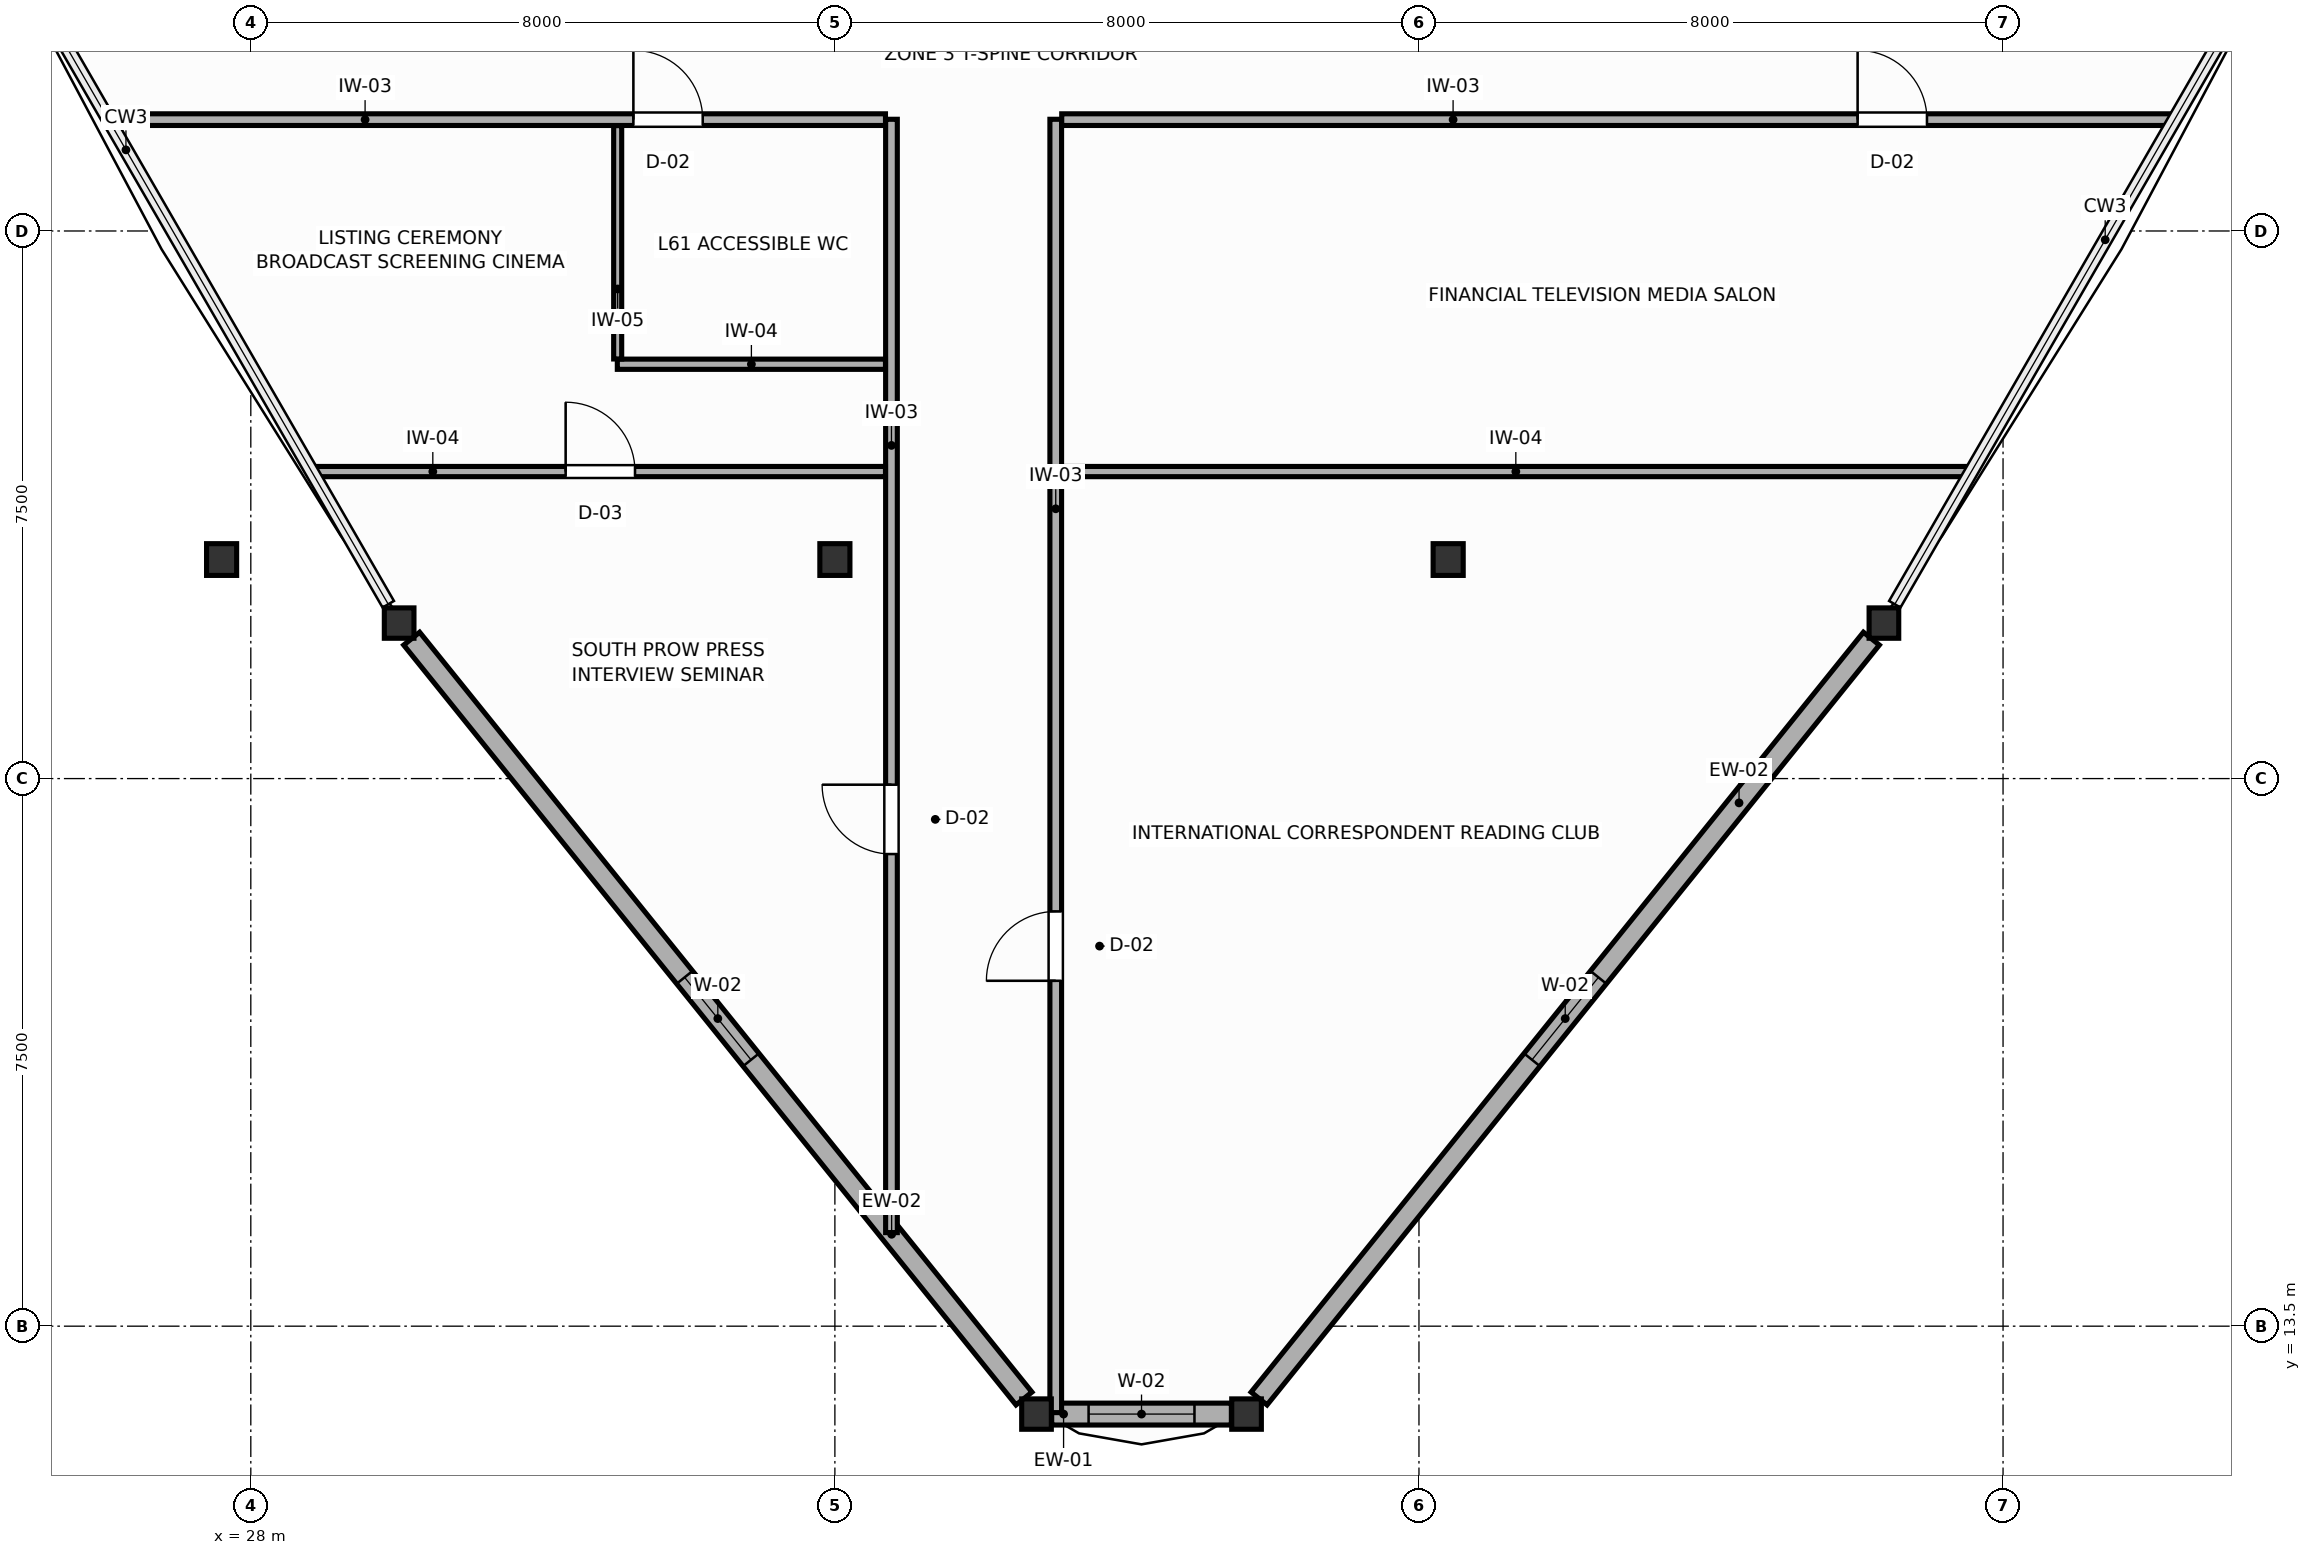
"""IFC4 building model, lengths in metres.
Left out: names, types, materials, properties, quantities, classifications, styles, units other than length and angle.
Written with IfcOpenShell. Run it as: python <this file> out.ifc"""

import sys

from ifc_helpers import new_model, si_unit, direction, frame, frame_2d, origin, origin_2d, place, context, subcontext, project, spatial, rectangle, i_section, extrude, source, transform, mapped, element, fill, save


model = new_model("IFC4")
c1 = context("Model", 3, precision=1e-05, world=origin(), true_north=direction((0.0, 1.0)))
c2 = subcontext(c1, "Body", "Model", "MODEL_VIEW")
j1 = project(units=[si_unit("LENGTHUNIT", "METRE"), si_unit("PLANEANGLEUNIT", "RADIAN")], contexts=[c1])
p1 = place(None, origin())
s1 = spatial("IfcSite", under=j1, at=p1, CompositionType="ELEMENT")
p2 = place(p1, origin())
s2 = spatial("IfcBuilding", under=s1, at=p2, CompositionType="ELEMENT")
p3 = place(p2, frame((0.0, 0.0, 234.6)))
s3 = spatial("IfcBuildingStorey", under=s2, at=p3, CompositionType="ELEMENT", Elevation=234.6)
m1 = source(origin(), c2, "Body", "SweptSolid", [
    extrude(i_section(OverallWidth=0.412, OverallDepth=0.435, WebThickness=0.033, FlangeThickness=0.053, FilletRadius=0.015, at=origin_2d()), origin(), (0.0, 0.0, 1.0), 3.6),
])
for number, where, z_axis, x_axis in (
    (1, (27.6, 24.0, 0.0), (0.0, 0.0, 1.0), (1.0, 0.0, 0.0)),
    (2, (44.4, 24.0, 0.0), (0.0, 0.0, 1.0), (1.0, 0.0, 0.0)),
    (3, (36.0, 24.0, 0.0), (0.0, 0.0, 1.0), (1.0, 0.0, 0.0)),
):
    element("IfcColumn", number, at=place(p3, frame(where, z_axis=z_axis, x_axis=x_axis)), inside=s3, PredefinedType="COLUMN", context=c2, shape_type="MappedRepresentation", body=[
        mapped(m1, transform((0.0, 0.0, 0.0), scale=1.0)),
    ])
m2 = source(origin(), c2, "Body", "SweptSolid", [
    extrude(i_section(OverallWidth=0.406, OverallDepth=0.416, WebThickness=0.027, FlangeThickness=0.044, FilletRadius=0.015, at=origin_2d()), origin(), (0.0, 0.0, 1.0), 3.6),
])
for number, where, z_axis, x_axis in (
    (4, (30.032, 23.13, 0.0), (0.0, 0.0, 1.0), (1.0, 0.0, 0.0)),
    (5, (38.762, 12.296, 0.0), (0.0, 0.0, 1.0), (1.0, 0.0, 0.0)),
    (6, (41.638, 12.296, 0.0), (0.0, 0.0, 1.0), (1.0, 0.0, 0.0)),
    (7, (50.368, 23.13, 0.0), (0.0, 0.0, 1.0), (1.0, 0.0, 0.0)),
):
    element("IfcColumn", number, at=place(p3, frame(where, z_axis=z_axis, x_axis=x_axis)), inside=s3, PredefinedType="COLUMN", context=c2, shape_type="MappedRepresentation", body=[
        mapped(m2, transform((0.0, 0.0, 0.0), scale=1.0)),
    ])
p4 = place(p3, frame((30.203, 22.917, 0.0), z_axis=(0.0, 0.0, 1.0), x_axis=(0.627453225305, -0.778654255786, 0.0)))
e8 = element("IfcWall", 8, at=p4, inside=s3, PredefinedType="SOLIDWALL", context=c2, shape_type="SweptSolid", body=[
    extrude(rectangle(XDim=13.366, YDim=0.28, at=frame_2d((6.683, 0.0))), origin(), (0.0, 0.0, 1.0), 2.81),
])
p5 = place(p4, frame((5.958, 0.0, 0.75)))
e9 = element("IfcOpeningElement", 9, at=p5, cuts=e8, PredefinedType="OPENING", context=c2, shape_type="SweptSolid", body=[
    extrude(rectangle(XDim=1.45, YDim=1.65, at=frame_2d((0.725, 0.825))), frame((0.0, 0.15, 0.0), z_axis=(0.0, -1.0, 0.0), x_axis=(1.0, 0.0, 0.0)), (0.0, 0.0, 1.0), 0.3),
])
p6 = place(p3, frame((38.969, 12.296, 0.0), z_axis=(0.0, 0.0, 1.0), x_axis=(1.0, 0.0, 0.0)))
e10 = element("IfcWall", 10, at=p6, inside=s3, PredefinedType="SOLIDWALL", context=c2, shape_type="SweptSolid", body=[
    extrude(rectangle(XDim=2.461, YDim=0.3, at=frame_2d((1.23, 0.0))), origin(), (0.0, 0.0, 1.0), 2.87),
])
p7 = place(p6, frame((0.505, 0.0, 0.75)))
e11 = element("IfcOpeningElement", 11, at=p7, cuts=e10, PredefinedType="OPENING", context=c2, shape_type="SweptSolid", body=[
    extrude(rectangle(XDim=1.45, YDim=1.65, at=frame_2d((0.725, 0.825))), frame((0.0, 0.16, 0.0), z_axis=(0.0, -1.0, 0.0), x_axis=(1.0, 0.0, 0.0)), (0.0, 0.0, 1.0), 0.32),
])
p8 = place(p3, frame((41.81, 12.509, 0.0), z_axis=(0.0, 0.0, 1.0), x_axis=(0.627453225305, 0.778654255786, 0.0)))
e12 = element("IfcWall", 12, at=p8, inside=s3, PredefinedType="SOLIDWALL", context=c2, shape_type="SweptSolid", body=[
    extrude(rectangle(XDim=13.366, YDim=0.28, at=frame_2d((6.683, 0.0))), origin(), (0.0, 0.0, 1.0), 2.81),
])
p9 = place(p8, frame((5.958, 0.0, 0.75)))
e13 = element("IfcOpeningElement", 13, at=p9, cuts=e12, PredefinedType="OPENING", context=c2, shape_type="SweptSolid", body=[
    extrude(rectangle(XDim=1.45, YDim=1.65, at=frame_2d((0.725, 0.825))), frame((0.0, 0.15, 0.0), z_axis=(0.0, -1.0, 0.0), x_axis=(1.0, 0.0, 0.0)), (0.0, 0.0, 1.0), 0.3),
])
p10 = place(p3, frame((39.025, 12.316, 0.0), z_axis=(0.0, 0.0, 1.0), x_axis=(0.0, 1.0, 0.0)))
e14 = element("IfcWall", 14, at=p10, inside=s3, PredefinedType="PARTITIONING", context=c2, shape_type="SweptSolid", body=[
    extrude(rectangle(XDim=17.714, YDim=0.16, at=frame_2d((8.857, 0.0))), origin(), (0.0, 0.0, 1.0), 3.26),
])
p11 = place(p10, frame((5.914, 0.0, 0.0)))
e15 = element("IfcOpeningElement", 15, at=p11, cuts=e14, PredefinedType="OPENING", context=c2, shape_type="SweptSolid", body=[
    extrude(rectangle(XDim=0.95, YDim=2.05, at=frame_2d((0.475, 1.025))), frame((0.0, 0.09, 0.0), z_axis=(0.0, -1.0, 0.0), x_axis=(1.0, 0.0, 0.0)), (0.0, 0.0, 1.0), 0.18),
])
p12 = place(p3, frame((39.107, 30.025, 0.0), z_axis=(0.0, 0.0, 1.0), x_axis=(1.0, 0.0, 0.0)))
e16 = element("IfcWall", 16, at=p12, inside=s3, PredefinedType="PARTITIONING", context=c2, shape_type="SweptSolid", body=[
    extrude(rectangle(XDim=15.222, YDim=0.16, at=frame_2d((7.611, 0.0))), origin(), (0.0, 0.0, 1.0), 3.26),
])
p13 = place(p12, frame((10.901, 0.0, 0.0)))
e17 = element("IfcOpeningElement", 17, at=p13, cuts=e16, PredefinedType="OPENING", context=c2, shape_type="SweptSolid", body=[
    extrude(rectangle(XDim=0.95, YDim=2.05, at=frame_2d((0.475, 1.025))), frame((0.0, 0.09, 0.0), z_axis=(0.0, -1.0, 0.0), x_axis=(1.0, 0.0, 0.0)), (0.0, 0.0, 1.0), 0.18),
])
p14 = place(p3, frame((36.775, 14.781, 0.0), z_axis=(0.0, 0.0, 1.0), x_axis=(0.0, 1.0, 0.0)))
e18 = element("IfcWall", 18, at=p14, inside=s3, PredefinedType="PARTITIONING", context=c2, shape_type="SweptSolid", body=[
    extrude(rectangle(XDim=15.249, YDim=0.16, at=frame_2d((7.624, 0.0))), origin(), (0.0, 0.0, 1.0), 2.81),
])
p15 = place(p14, frame((5.185, 0.0, 0.0)))
e19 = element("IfcOpeningElement", 19, at=p15, cuts=e18, PredefinedType="OPENING", context=c2, shape_type="SweptSolid", body=[
    extrude(rectangle(XDim=0.95, YDim=2.05, at=frame_2d((0.475, 1.025))), frame((0.0, 0.09, 0.0), z_axis=(0.0, -1.0, 0.0), x_axis=(1.0, 0.0, 0.0)), (0.0, 0.0, 1.0), 0.18),
])
p16 = place(p3, frame((26.071, 30.025, 0.0), z_axis=(0.0, 0.0, 1.0), x_axis=(1.0, 0.0, 0.0)))
e20 = element("IfcWall", 20, at=p16, inside=s3, PredefinedType="PARTITIONING", context=c2, shape_type="SweptSolid", body=[
    extrude(rectangle(XDim=10.622, YDim=0.16, at=frame_2d((5.311, 0.0))), origin(), (0.0, 0.0, 1.0), 3.26),
])
p17 = place(p16, frame((7.169, 0.0, 0.0)))
e21 = element("IfcOpeningElement", 21, at=p17, cuts=e20, PredefinedType="OPENING", context=c2, shape_type="SweptSolid", body=[
    extrude(rectangle(XDim=0.95, YDim=2.05, at=frame_2d((0.475, 1.025))), frame((0.0, 0.09, 0.0), z_axis=(0.0, -1.0, 0.0), x_axis=(1.0, 0.0, 0.0)), (0.0, 0.0, 1.0), 0.18),
])
p18 = place(p3, frame((39.107, 25.205, 0.0), z_axis=(0.0, 0.0, 1.0), x_axis=(1.0, 0.0, 0.0)))
e22 = element("IfcWall", 22, at=p18, inside=s3, PredefinedType="PARTITIONING", context=c2, shape_type="SweptSolid", body=[
    extrude(rectangle(XDim=12.439, YDim=0.14, at=frame_2d((6.22, 0.0))), origin(), (0.0, 0.0, 1.0), 3.26),
])
p19 = place(p3, frame((28.854, 25.205, 0.0), z_axis=(0.0, 0.0, 1.0), x_axis=(1.0, 0.0, 0.0)))
e23 = element("IfcWall", 23, at=p19, inside=s3, PredefinedType="PARTITIONING", context=c2, shape_type="SweptSolid", body=[
    extrude(rectangle(XDim=7.84, YDim=0.14, at=frame_2d((3.92, 0.0))), origin(), (0.0, 0.0, 1.0), 3.26),
])
p20 = place(p19, frame((3.459, 0.0, 0.0)))
e24 = element("IfcOpeningElement", 24, at=p20, cuts=e23, PredefinedType="OPENING", context=c2, shape_type="SweptSolid", body=[
    extrude(rectangle(XDim=0.95, YDim=2.05, at=frame_2d((0.475, 1.025))), frame((0.0, 0.08, 0.0), z_axis=(0.0, -1.0, 0.0), x_axis=(1.0, 0.0, 0.0)), (0.0, 0.0, 1.0), 0.16),
])
p21 = place(p3, frame((33.02, 26.675, 0.0), z_axis=(0.0, 0.0, 1.0), x_axis=(1.0, 0.0, 0.0)))
e25 = element("IfcWall", 25, at=p21, inside=s3, PredefinedType="PARTITIONING", context=c2, shape_type="SweptSolid", body=[
    extrude(rectangle(XDim=3.673, YDim=0.14, at=frame_2d((1.836, 0.0))), origin(), (0.0, 0.0, 1.0), 3.26),
])
p22 = place(p3, frame((33.025, 26.747, 0.0), z_axis=(0.0, 0.0, 1.0), x_axis=(0.0, 1.0, 0.0)))
e26 = element("IfcWall", 26, at=p22, inside=s3, PredefinedType="MOVABLE", context=c2, shape_type="SweptSolid", body=[
    extrude(rectangle(XDim=3.196, YDim=0.11, at=frame_2d((1.598, 0.0))), origin(), (0.0, 0.0, 1.0), 3.26),
])
p23 = place(p5, origin())
e27 = element("IfcWindow", 27, at=p23, inside=s3, PartitioningType="SINGLE_PANEL", PredefinedType="WINDOW", context=c2, shape_type="SweptSolid", body=[
    extrude(rectangle(XDim=1.45, YDim=1.65, at=frame_2d((0.725, 0.825))), frame((0.0, 0.03, 0.0), z_axis=(0.0, -1.0, 0.0), x_axis=(1.0, 0.0, 0.0)), (0.0, 0.0, 1.0), 0.06),
])
fill(e9, e27)
p24 = place(p7, origin())
e28 = element("IfcWindow", 28, at=p24, inside=s3, PartitioningType="SINGLE_PANEL", PredefinedType="WINDOW", context=c2, shape_type="SweptSolid", body=[
    extrude(rectangle(XDim=1.45, YDim=1.65, at=frame_2d((0.725, 0.825))), frame((0.0, 0.03, 0.0), z_axis=(0.0, -1.0, 0.0), x_axis=(1.0, 0.0, 0.0)), (0.0, 0.0, 1.0), 0.06),
])
fill(e11, e28)
p25 = place(p9, origin())
e29 = element("IfcWindow", 29, at=p25, inside=s3, PartitioningType="SINGLE_PANEL", PredefinedType="WINDOW", context=c2, shape_type="SweptSolid", body=[
    extrude(rectangle(XDim=1.45, YDim=1.65, at=frame_2d((0.725, 0.825))), frame((0.0, 0.03, 0.0), z_axis=(0.0, -1.0, 0.0), x_axis=(1.0, 0.0, 0.0)), (0.0, 0.0, 1.0), 0.06),
])
fill(e13, e29)
p26 = place(p11, origin())
e30 = element("IfcDoor", 30, at=p26, inside=s3, OperationType="SINGLE_SWING_LEFT", PredefinedType="DOOR", context=c2, shape_type="SweptSolid", body=[
    extrude(rectangle(XDim=0.95, YDim=2.05, at=frame_2d((0.475, 1.025))), frame((0.0, 0.025, 0.0), z_axis=(0.0, -1.0, 0.0), x_axis=(1.0, 0.0, 0.0)), (0.0, 0.0, 1.0), 0.05),
])
fill(e15, e30)
p27 = place(p13, origin())
e31 = element("IfcDoor", 31, at=p27, inside=s3, OperationType="SINGLE_SWING_LEFT", PredefinedType="DOOR", context=c2, shape_type="SweptSolid", body=[
    extrude(rectangle(XDim=0.95, YDim=2.05, at=frame_2d((0.475, 1.025))), frame((0.0, 0.025, 0.0), z_axis=(0.0, -1.0, 0.0), x_axis=(1.0, 0.0, 0.0)), (0.0, 0.0, 1.0), 0.05),
])
fill(e17, e31)
p28 = place(p15, origin())
e32 = element("IfcDoor", 32, at=p28, inside=s3, OperationType="SINGLE_SWING_RIGHT", PredefinedType="DOOR", context=c2, shape_type="SweptSolid", body=[
    extrude(rectangle(XDim=0.95, YDim=2.05, at=frame_2d((0.475, 1.025))), frame((0.0, 0.025, 0.0), z_axis=(0.0, -1.0, 0.0), x_axis=(1.0, 0.0, 0.0)), (0.0, 0.0, 1.0), 0.05),
])
fill(e19, e32)
p29 = place(p17, origin())
e33 = element("IfcDoor", 33, at=p29, inside=s3, OperationType="SINGLE_SWING_LEFT", PredefinedType="DOOR", context=c2, shape_type="SweptSolid", body=[
    extrude(rectangle(XDim=0.95, YDim=2.05, at=frame_2d((0.475, 1.025))), frame((0.0, 0.025, 0.0), z_axis=(0.0, -1.0, 0.0), x_axis=(1.0, 0.0, 0.0)), (0.0, 0.0, 1.0), 0.05),
])
fill(e21, e33)
p30 = place(p20, origin())
e34 = element("IfcDoor", 34, at=p30, inside=s3, OperationType="SINGLE_SWING_LEFT", PredefinedType="DOOR", context=c2, shape_type="SweptSolid", body=[
    extrude(rectangle(XDim=0.95, YDim=2.05, at=frame_2d((0.475, 1.025))), frame((0.0, 0.025, 0.0), z_axis=(0.0, -1.0, 0.0), x_axis=(1.0, 0.0, 0.0)), (0.0, 0.0, 1.0), 0.05),
])
fill(e24, e34)
save(model, sys.argv[1])
